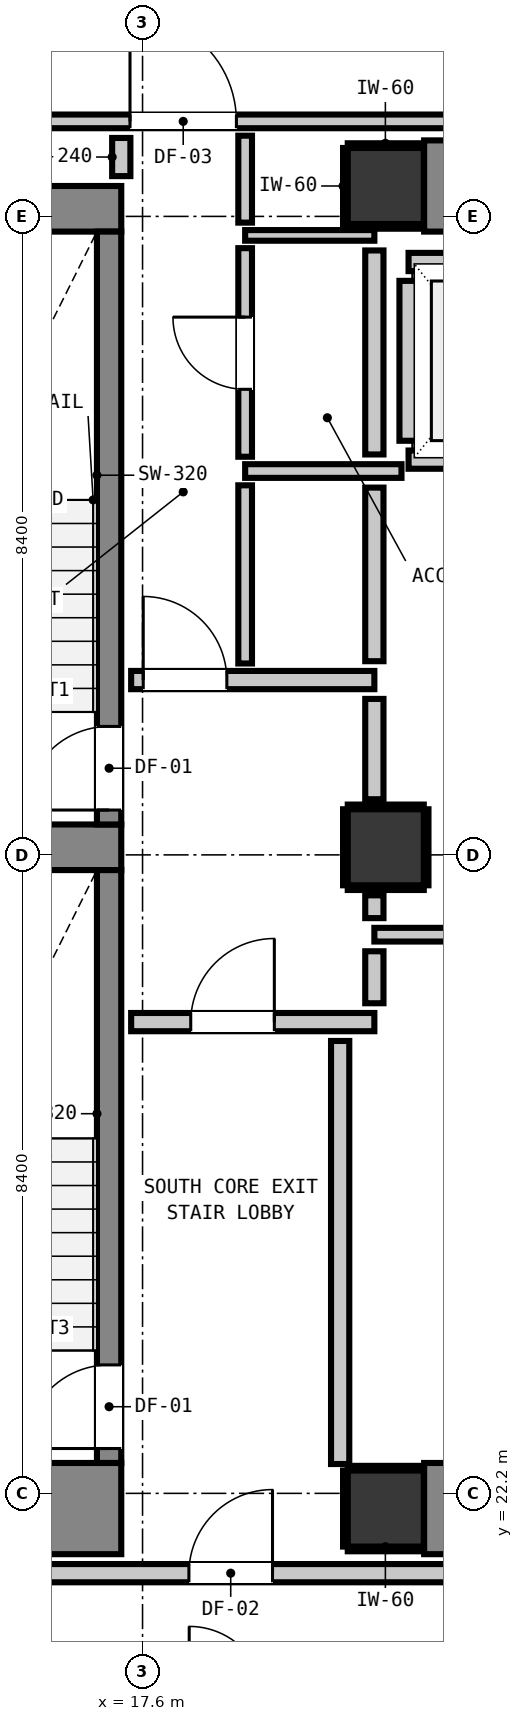
"""IFC4 building model, lengths in metres.
Left out: names, types, materials, properties, quantities, classifications, styles, units other than length and angle.
Written with IfcOpenShell. Run it as: python <this file> out.ifc"""

import sys

from ifc_helpers import new_model, si_unit, direction, frame, frame_2d, origin, origin_2d, place, context, subcontext, project, spatial, rectangle, extrude, element, fill, save


model = new_model("IFC4")
c1 = context("Model", 3, precision=1e-05, world=origin(), true_north=direction((0.0, 1.0)))
c2 = subcontext(c1, "Body", "Model", "MODEL_VIEW")
j1 = project(units=[si_unit("LENGTHUNIT", "METRE"), si_unit("PLANEANGLEUNIT", "RADIAN")], contexts=[c1])
p1 = place(None, origin())
s1 = spatial("IfcSite", under=j1, at=p1, CompositionType="ELEMENT")
p2 = place(p1, origin())
s2 = spatial("IfcBuilding", under=s1, at=p2, CompositionType="ELEMENT")
p3 = place(p2, frame((0.0, 0.0, 75.12)))
s3 = spatial("IfcBuildingStorey", under=s2, at=p3, CompositionType="ELEMENT", Elevation=75.12)
for number, where, z_axis, x_axis in (
    (1, (20.8, 22.0, 0.0), (0.0, 0.0, 1.0), (1.0, 0.0, 0.0)),
    (2, (20.8, 39.4, 0.0), (0.0, 0.0, 1.0), (1.0, 0.0, 0.0)),
):
    element("IfcColumn", number, at=place(p3, frame(where, z_axis=z_axis, x_axis=x_axis)), inside=s3, PredefinedType="COLUMN", context=c2, shape_type="SweptSolid", body=[
        extrude(rectangle(XDim=1.0, YDim=1.0, at=origin_2d()), origin(), (0.0, 0.0, 1.0), 3.32),
    ])
p4 = place(p3, frame((13.24, 22.0, 0.0), z_axis=(0.0, 0.0, 1.0), x_axis=(1.0, 0.0, 0.0)))
e3 = element("IfcWall", 3, at=p4, inside=s3, PredefinedType="SHEAR", context=c2, shape_type="SweptSolid", body=[
    extrude(rectangle(XDim=4.08, YDim=1.2, at=frame_2d((2.04, 0.0))), origin(), (0.0, 0.0, 1.0), 3.32),
])
p5 = place(p3, frame((13.24, 39.1, 0.0), z_axis=(0.0, 0.0, 1.0), x_axis=(1.0, 0.0, 0.0)))
e4 = element("IfcWall", 4, at=p5, inside=s3, PredefinedType="SHEAR", context=c2, shape_type="SweptSolid", body=[
    extrude(rectangle(XDim=4.08, YDim=0.6, at=frame_2d((2.04, 0.0))), origin(), (0.0, 0.0, 1.0), 3.32),
])
p6 = place(p3, frame((13.905, 30.7, 0.0), z_axis=(0.0, 0.0, 1.0), x_axis=(1.0, 0.0, 0.0)))
e5 = element("IfcWall", 5, at=p6, inside=s3, PredefinedType="SHEAR", context=c2, shape_type="SweptSolid", body=[
    extrude(rectangle(XDim=3.415, YDim=0.6, at=frame_2d((1.708, 0.0))), origin(), (0.0, 0.0, 1.0), 3.32),
])
for number, where, z_axis, x_axis in (
    (6, (21.305, 22.0, 0.0), (0.0, 0.0, 1.0), (1.0, 0.0, 0.0)),
    (7, (21.305, 39.4, 0.0), (0.0, 0.0, 1.0), (1.0, 0.0, 0.0)),
):
    element("IfcWall", number, at=place(p3, frame(where, z_axis=z_axis, x_axis=x_axis)), inside=s3, PredefinedType="SHEAR", context=c2, shape_type="SweptSolid", body=[
        extrude(rectangle(XDim=7.39, YDim=1.2, at=frame_2d((3.695, 0.0))), origin(), (0.0, 0.0, 1.0), 3.32),
    ])
p7 = place(p3, frame((17.16, 31.0, 0.0), z_axis=(0.0, 0.0, 1.0), x_axis=(0.0, 1.0, 0.0)))
e8 = element("IfcWall", 8, at=p7, inside=s3, PredefinedType="SHEAR", context=c2, shape_type="SweptSolid", body=[
    extrude(rectangle(XDim=7.8, YDim=0.32, at=frame_2d((3.9, 0.0))), origin(), (0.0, 0.0, 1.0), 3.32),
])
p8 = place(p7, frame((0.19, 0.0, 0.0)))
e9 = element("IfcOpeningElement", 9, at=p8, cuts=e8, PredefinedType="OPENING", context=c2, shape_type="SweptSolid", body=[
    extrude(rectangle(XDim=1.1, YDim=2.15, at=frame_2d((0.55, 1.075))), frame((0.0, 0.17, 0.0), z_axis=(0.0, -1.0, 0.0), x_axis=(1.0, 0.0, 0.0)), (0.0, 0.0, 1.0), 0.34),
])
p9 = place(p3, frame((17.16, 22.6, 0.0), z_axis=(0.0, 0.0, 1.0), x_axis=(0.0, 1.0, 0.0)))
e10 = element("IfcWall", 10, at=p9, inside=s3, PredefinedType="SHEAR", context=c2, shape_type="SweptSolid", body=[
    extrude(rectangle(XDim=7.8, YDim=0.32, at=frame_2d((3.9, 0.0))), origin(), (0.0, 0.0, 1.0), 3.32),
])
p10 = place(p9, frame((0.19, 0.0, 0.0)))
e11 = element("IfcOpeningElement", 11, at=p10, cuts=e10, PredefinedType="OPENING", context=c2, shape_type="SweptSolid", body=[
    extrude(rectangle(XDim=1.1, YDim=2.15, at=frame_2d((0.55, 1.075))), frame((0.0, 0.17, 0.0), z_axis=(0.0, -1.0, 0.0), x_axis=(1.0, 0.0, 0.0)), (0.0, 0.0, 1.0), 0.34),
])
p11 = place(p3, frame((20.8, 30.7, 0.0), z_axis=(0.0, 0.0, 1.0), x_axis=(1.0, 0.0, 0.0)))
e12 = element("IfcColumn", 12, at=p11, inside=s3, PredefinedType="COLUMN", context=c2, shape_type="SweptSolid", body=[
    extrude(rectangle(XDim=1.0, YDim=1.0, at=origin_2d()), origin(), (0.0, 0.0, 1.0), 3.32),
])
for number, where, z_axis, x_axis in (
    (13, (21.1, 35.8, 0.0), (0.0, 0.0, 1.0), (1.0, 0.0, 0.0)),
    (14, (21.1, 38.4, 0.0), (0.0, 0.0, 1.0), (1.0, 0.0, 0.0)),
):
    element("IfcWall", number, at=place(p3, frame(where, z_axis=z_axis, x_axis=x_axis)), inside=s3, PredefinedType="PARTITIONING", context=c2, shape_type="SweptSolid", body=[
        extrude(rectangle(XDim=2.2, YDim=0.24, at=frame_2d((1.1, 0.0))), origin(), (0.0, 0.0, 1.0), 3.06),
    ])
p12 = place(p3, frame((21.1, 36.048, 0.0), z_axis=(0.0, 0.0, 1.0), x_axis=(0.0, 1.0, 0.0)))
e15 = element("IfcWall", 15, at=p12, inside=s3, PredefinedType="PARTITIONING", context=c2, shape_type="SweptSolid", body=[
    extrude(rectangle(XDim=2.104, YDim=0.24, at=frame_2d((1.052, 0.0))), origin(), (0.0, 0.0, 1.0), 2.295),
])
p13 = place(p3, frame((10.15, 21.15, 0.0), z_axis=(0.0, 0.0, 1.0), x_axis=(1.0, 0.0, 0.0)))
e16 = element("IfcWall", 16, at=p13, inside=s3, PredefinedType="PARTITIONING", context=c2, shape_type="SweptSolid", body=[
    extrude(rectangle(XDim=26.779, YDim=0.24, at=frame_2d((13.39, 0.0))), origin(), (0.0, 0.0, 1.0), 3.06),
])
p14 = place(p13, frame((8.06, 0.0, 0.0)))
e17 = element("IfcOpeningElement", 17, at=p14, cuts=e16, PredefinedType="OPENING", context=c2, shape_type="SweptSolid", body=[
    extrude(rectangle(XDim=1.1, YDim=2.15, at=frame_2d((0.55, 1.075))), frame((0.0, 0.13, 0.0), z_axis=(0.0, -1.0, 0.0), x_axis=(1.0, 0.0, 0.0)), (0.0, 0.0, 1.0), 0.26),
])
p15 = place(p13, frame((0.324, 0.0, 0.0)))
e18 = element("IfcOpeningElement", 18, at=p15, cuts=e16, PredefinedType="OPENING", context=c2, shape_type="SweptSolid", body=[
    extrude(rectangle(XDim=1.4, YDim=2.15, at=frame_2d((0.7, 1.075))), frame((0.0, 0.13, 0.0), z_axis=(0.0, -1.0, 0.0), x_axis=(1.0, 0.0, 0.0)), (0.0, 0.0, 1.0), 0.26),
])
p16 = place(p3, frame((17.45, 28.4, 0.0), z_axis=(0.0, 0.0, 1.0), x_axis=(1.0, 0.0, 0.0)))
e19 = element("IfcWall", 19, at=p16, inside=s3, PredefinedType="PARTITIONING", context=c2, shape_type="SweptSolid", body=[
    extrude(rectangle(XDim=3.2, YDim=0.24, at=frame_2d((1.6, 0.0))), origin(), (0.0, 0.0, 1.0), 3.06),
])
p17 = place(p16, frame((0.784, 0.0, 0.0)))
e20 = element("IfcOpeningElement", 20, at=p17, cuts=e19, PredefinedType="OPENING", context=c2, shape_type="SweptSolid", body=[
    extrude(rectangle(XDim=1.1, YDim=2.15, at=frame_2d((0.55, 1.075))), frame((0.0, 0.13, 0.0), z_axis=(0.0, -1.0, 0.0), x_axis=(1.0, 0.0, 0.0)), (0.0, 0.0, 1.0), 0.26),
])
p18 = place(p3, frame((17.45, 32.9, 0.0), z_axis=(0.0, 0.0, 1.0), x_axis=(1.0, 0.0, 0.0)))
e21 = element("IfcWall", 21, at=p18, inside=s3, PredefinedType="PARTITIONING", context=c2, shape_type="SweptSolid", body=[
    extrude(rectangle(XDim=3.2, YDim=0.24, at=frame_2d((1.6, 0.0))), origin(), (0.0, 0.0, 1.0), 3.06),
])
p19 = place(p18, frame((0.159, 0.0, 0.0)))
e22 = element("IfcOpeningElement", 22, at=p19, cuts=e21, PredefinedType="OPENING", context=c2, shape_type="SweptSolid", body=[
    extrude(rectangle(XDim=1.1, YDim=2.15, at=frame_2d((0.55, 1.075))), frame((0.0, 0.13, 0.0), z_axis=(0.0, -1.0, 0.0), x_axis=(1.0, 0.0, 0.0)), (0.0, 0.0, 1.0), 0.26),
])
p20 = place(p3, frame((20.65, 29.55, 0.0), z_axis=(0.0, 0.0, 1.0), x_axis=(1.0, 0.0, 0.0)))
e23 = element("IfcWall", 23, at=p20, inside=s3, PredefinedType="PARTITIONING", context=c2, shape_type="SweptSolid", body=[
    extrude(rectangle(XDim=9.325, YDim=0.18, at=frame_2d((4.663, 0.0))), origin(), (0.0, 0.0, 1.0), 3.06),
])
p21 = place(p3, frame((18.95, 35.65, 0.0), z_axis=(0.0, 0.0, 1.0), x_axis=(1.0, 0.0, 0.0)))
e24 = element("IfcWall", 24, at=p21, inside=s3, PredefinedType="PARTITIONING", context=c2, shape_type="SweptSolid", body=[
    extrude(rectangle(XDim=2.057, YDim=0.18, at=frame_2d((1.029, 0.0))), origin(), (0.0, 0.0, 1.0), 3.06),
])
p22 = place(p3, frame((10.15, 40.25, 0.0), z_axis=(0.0, 0.0, 1.0), x_axis=(1.0, 0.0, 0.0)))
e25 = element("IfcWall", 25, at=p22, inside=s3, PredefinedType="PARTITIONING", context=c2, shape_type="SweptSolid", body=[
    extrude(rectangle(XDim=40.023, YDim=0.18, at=frame_2d((20.012, 0.0))), origin(), (0.0, 0.0, 1.0), 3.06),
])
p23 = place(p22, frame((7.285, 0.0, 0.0)))
e26 = element("IfcOpeningElement", 26, at=p23, cuts=e25, PredefinedType="OPENING", context=c2, shape_type="SweptSolid", body=[
    extrude(rectangle(XDim=1.4, YDim=2.15, at=frame_2d((0.7, 1.075))), frame((0.0, 0.1, 0.0), z_axis=(0.0, -1.0, 0.0), x_axis=(1.0, 0.0, 0.0)), (0.0, 0.0, 1.0), 0.2),
])
p24 = place(p22, frame((0.324, 0.0, 0.0)))
e27 = element("IfcOpeningElement", 27, at=p24, cuts=e25, PredefinedType="OPENING", context=c2, shape_type="SweptSolid", body=[
    extrude(rectangle(XDim=1.4, YDim=2.15, at=frame_2d((0.7, 1.075))), frame((0.0, 0.1, 0.0), z_axis=(0.0, -1.0, 0.0), x_axis=(1.0, 0.0, 0.0)), (0.0, 0.0, 1.0), 0.2),
])
p25 = place(p22, frame((33.574, 0.0, 0.0)))
e28 = element("IfcOpeningElement", 28, at=p25, cuts=e25, PredefinedType="OPENING", context=c2, shape_type="SweptSolid", body=[
    extrude(rectangle(XDim=1.0, YDim=2.15, at=frame_2d((0.5, 1.075))), frame((0.0, 0.1, 0.0), z_axis=(0.0, -1.0, 0.0), x_axis=(1.0, 0.0, 0.0)), (0.0, 0.0, 1.0), 0.2),
])
p26 = place(p3, frame((18.95, 38.75, 0.0), z_axis=(0.0, 0.0, 1.0), x_axis=(1.0, 0.0, 0.0)))
e29 = element("IfcWall", 29, at=p26, inside=s3, PredefinedType="PARTITIONING", context=c2, shape_type="SweptSolid", body=[
    extrude(rectangle(XDim=1.7, YDim=0.14, at=frame_2d((0.85, 0.0))), origin(), (0.0, 0.0, 1.0), 3.06),
])
p27 = place(p3, frame((17.32, 39.53, 0.0), z_axis=(0.0, 0.0, 1.0), x_axis=(0.0, 1.0, 0.0)))
e30 = element("IfcWall", 30, at=p27, inside=s3, PredefinedType="PARTITIONING", context=c2, shape_type="SweptSolid", body=[
    extrude(rectangle(XDim=0.502, YDim=0.24, at=frame_2d((0.251, 0.0))), origin(), (0.0, 0.0, 1.0), 3.06),
])
p28 = place(p3, frame((20.2, 22.586, 0.0), z_axis=(0.0, 0.0, 1.0), x_axis=(0.0, 1.0, 0.0)))
e31 = element("IfcWall", 31, at=p28, inside=s3, PredefinedType="PARTITIONING", context=c2, shape_type="SweptSolid", body=[
    extrude(rectangle(XDim=5.566, YDim=0.24, at=frame_2d((2.783, 0.0))), origin(), (0.0, 0.0, 1.0), 3.06),
])
p29 = place(p3, frame((20.65, 28.648, 0.0), z_axis=(0.0, 0.0, 1.0), x_axis=(0.0, 1.0, 0.0)))
e32 = element("IfcWall", 32, at=p29, inside=s3, PredefinedType="PARTITIONING", context=c2, shape_type="SweptSolid", body=[
    extrude(rectangle(XDim=0.684, YDim=0.24, at=frame_2d((0.342, 0.0))), origin(), (0.0, 0.0, 1.0), 2.295),
])
p30 = place(p3, frame((20.65, 29.768, 0.0), z_axis=(0.0, 0.0, 1.0), x_axis=(0.0, 1.0, 0.0)))
e33 = element("IfcWall", 33, at=p30, inside=s3, PredefinedType="PARTITIONING", context=c2, shape_type="SweptSolid", body=[
    extrude(rectangle(XDim=0.3, YDim=0.24, at=frame_2d((0.15, 0.0))), origin(), (0.0, 0.0, 1.0), 2.295),
])
p31 = place(p3, frame((20.65, 31.332, 0.0), z_axis=(0.0, 0.0, 1.0), x_axis=(0.0, 1.0, 0.0)))
e34 = element("IfcWall", 34, at=p31, inside=s3, PredefinedType="PARTITIONING", context=c2, shape_type="SweptSolid", body=[
    extrude(rectangle(XDim=1.32, YDim=0.24, at=frame_2d((0.66, 0.0))), origin(), (0.0, 0.0, 1.0), 2.295),
])
p32 = place(p3, frame((20.65, 33.148, 0.0), z_axis=(0.0, 0.0, 1.0), x_axis=(0.0, 1.0, 0.0)))
e35 = element("IfcWall", 35, at=p32, inside=s3, PredefinedType="PARTITIONING", context=c2, shape_type="SweptSolid", body=[
    extrude(rectangle(XDim=2.284, YDim=0.24, at=frame_2d((1.142, 0.0))), origin(), (0.0, 0.0, 1.0), 2.295),
])
p33 = place(p3, frame((20.65, 35.868, 0.0), z_axis=(0.0, 0.0, 1.0), x_axis=(0.0, 1.0, 0.0)))
e36 = element("IfcWall", 36, at=p33, inside=s3, PredefinedType="PARTITIONING", context=c2, shape_type="SweptSolid", body=[
    extrude(rectangle(XDim=2.684, YDim=0.24, at=frame_2d((1.342, 0.0))), origin(), (0.0, 0.0, 1.0), 2.295),
])
p34 = place(p3, frame((18.95, 33.118, 0.0), z_axis=(0.0, 0.0, 1.0), x_axis=(0.0, 1.0, 0.0)))
e37 = element("IfcWall", 37, at=p34, inside=s3, PredefinedType="PARTITIONING", context=c2, shape_type="SweptSolid", body=[
    extrude(rectangle(XDim=2.344, YDim=0.18, at=frame_2d((1.172, 0.0))), origin(), (0.0, 0.0, 1.0), 3.06),
])
p35 = place(p3, frame((18.95, 35.838, 0.0), z_axis=(0.0, 0.0, 1.0), x_axis=(0.0, 1.0, 0.0)))
e38 = element("IfcWall", 38, at=p35, inside=s3, PredefinedType="PARTITIONING", context=c2, shape_type="SweptSolid", body=[
    extrude(rectangle(XDim=2.744, YDim=0.18, at=frame_2d((1.372, 0.0))), origin(), (0.0, 0.0, 1.0), 3.06),
])
p36 = place(p35, frame((0.887, 0.0, 0.0)))
e39 = element("IfcOpeningElement", 39, at=p36, cuts=e38, PredefinedType="OPENING", context=c2, shape_type="SweptSolid", body=[
    extrude(rectangle(XDim=0.95, YDim=2.1, at=frame_2d((0.475, 1.05))), frame((0.0, 0.1, 0.0), z_axis=(0.0, -1.0, 0.0), x_axis=(1.0, 0.0, 0.0)), (0.0, 0.0, 1.0), 0.2),
])
p37 = place(p3, frame((18.95, 38.918, 0.0), z_axis=(0.0, 0.0, 1.0), x_axis=(0.0, 1.0, 0.0)))
e40 = element("IfcWall", 40, at=p37, inside=s3, PredefinedType="PARTITIONING", context=c2, shape_type="SweptSolid", body=[
    extrude(rectangle(XDim=1.144, YDim=0.18, at=frame_2d((0.572, 0.0))), origin(), (0.0, 0.0, 1.0), 3.06),
])
for number, where, z_axis, x_axis in (
    (41, (20.3, 21.468, 0.0), (0.0, 0.0, 1.0), (1.0, 0.0, 0.0)),
    (42, (20.3, 22.532, 0.0), (0.0, 0.0, 1.0), (1.0, 0.0, 0.0)),
):
    element("IfcWall", number, at=place(p3, frame(where, z_axis=z_axis, x_axis=x_axis)), inside=s3, PredefinedType="PARTITIONING", context=c2, shape_type="SweptSolid", body=[
        extrude(rectangle(XDim=0.99, YDim=0.06, at=frame_2d((0.495, 0.0))), origin(), (0.0, 0.0, 1.0), 1.45),
    ])
p38 = place(p3, frame((20.268, 21.5, 0.0), z_axis=(0.0, 0.0, 1.0), x_axis=(0.0, 1.0, 0.0)))
e43 = element("IfcWall", 43, at=p38, inside=s3, PredefinedType="PARTITIONING", context=c2, shape_type="SweptSolid", body=[
    extrude(rectangle(XDim=1.0, YDim=0.06, at=frame_2d((0.5, 0.0))), origin(), (0.0, 0.0, 1.0), 1.45),
])
for number, where, z_axis, x_axis in (
    (44, (20.3, 38.868, 0.0), (0.0, 0.0, 1.0), (1.0, 0.0, 0.0)),
    (45, (20.3, 39.932, 0.0), (0.0, 0.0, 1.0), (1.0, 0.0, 0.0)),
):
    element("IfcWall", number, at=place(p3, frame(where, z_axis=z_axis, x_axis=x_axis)), inside=s3, PredefinedType="PARTITIONING", context=c2, shape_type="SweptSolid", body=[
        extrude(rectangle(XDim=0.99, YDim=0.06, at=frame_2d((0.495, 0.0))), origin(), (0.0, 0.0, 1.0), 1.45),
    ])
for number, where, z_axis, x_axis in (
    (46, (20.268, 38.9, 0.0), (0.0, 0.0, 1.0), (0.0, 1.0, 0.0)),
    (47, (20.3, 30.168, 0.0), (0.0, 0.0, 1.0), (1.0, 0.0, 0.0)),
    (48, (20.3, 31.232, 0.0), (0.0, 0.0, 1.0), (1.0, 0.0, 0.0)),
    (49, (20.268, 30.2, 0.0), (0.0, 0.0, 1.0), (0.0, 1.0, 0.0)),
    (50, (21.332, 30.2, 0.0), (0.0, 0.0, 1.0), (0.0, 1.0, 0.0)),
):
    element("IfcWall", number, at=place(p3, frame(where, z_axis=z_axis, x_axis=x_axis)), inside=s3, PredefinedType="PARTITIONING", context=c2, shape_type="SweptSolid", body=[
        extrude(rectangle(XDim=1.0, YDim=0.06, at=frame_2d((0.5, 0.0))), origin(), (0.0, 0.0, 1.0), 1.45),
    ])
p39 = place(p8, origin())
e51 = element("IfcDoor", 51, at=p39, inside=s3, OperationType="SINGLE_SWING_LEFT", PredefinedType="DOOR", context=c2, shape_type="SweptSolid", body=[
    extrude(rectangle(XDim=1.1, YDim=2.15, at=frame_2d((0.55, 1.075))), frame((0.0, 0.025, 0.0), z_axis=(0.0, -1.0, 0.0), x_axis=(1.0, 0.0, 0.0)), (0.0, 0.0, 1.0), 0.05),
])
fill(e9, e51)
p40 = place(p10, origin())
e52 = element("IfcDoor", 52, at=p40, inside=s3, OperationType="SINGLE_SWING_LEFT", PredefinedType="DOOR", context=c2, shape_type="SweptSolid", body=[
    extrude(rectangle(XDim=1.1, YDim=2.15, at=frame_2d((0.55, 1.075))), frame((0.0, 0.025, 0.0), z_axis=(0.0, -1.0, 0.0), x_axis=(1.0, 0.0, 0.0)), (0.0, 0.0, 1.0), 0.05),
])
fill(e11, e52)
p41 = place(p17, origin())
e53 = element("IfcDoor", 53, at=p41, inside=s3, OperationType="SINGLE_SWING_RIGHT", PredefinedType="DOOR", context=c2, shape_type="SweptSolid", body=[
    extrude(rectangle(XDim=1.1, YDim=2.15, at=frame_2d((0.55, 1.075))), frame((0.0, 0.025, 0.0), z_axis=(0.0, -1.0, 0.0), x_axis=(1.0, 0.0, 0.0)), (0.0, 0.0, 1.0), 0.05),
])
fill(e20, e53)
p42 = place(p19, origin())
e54 = element("IfcDoor", 54, at=p42, inside=s3, OperationType="SINGLE_SWING_LEFT", PredefinedType="DOOR", context=c2, shape_type="SweptSolid", body=[
    extrude(rectangle(XDim=1.1, YDim=2.15, at=frame_2d((0.55, 1.075))), frame((0.0, 0.025, 0.0), z_axis=(0.0, -1.0, 0.0), x_axis=(1.0, 0.0, 0.0)), (0.0, 0.0, 1.0), 0.05),
])
fill(e22, e54)
p43 = place(p14, origin())
e55 = element("IfcDoor", 55, at=p43, inside=s3, OperationType="SINGLE_SWING_RIGHT", PredefinedType="DOOR", context=c2, shape_type="SweptSolid", body=[
    extrude(rectangle(XDim=1.1, YDim=2.15, at=frame_2d((0.55, 1.075))), frame((0.0, 0.025, 0.0), z_axis=(0.0, -1.0, 0.0), x_axis=(1.0, 0.0, 0.0)), (0.0, 0.0, 1.0), 0.05),
])
fill(e17, e55)
p44 = place(p23, origin())
e56 = element("IfcDoor", 56, at=p44, inside=s3, OperationType="SINGLE_SWING_LEFT", PredefinedType="DOOR", context=c2, shape_type="SweptSolid", body=[
    extrude(rectangle(XDim=1.4, YDim=2.15, at=frame_2d((0.7, 1.075))), frame((0.0, 0.025, 0.0), z_axis=(0.0, -1.0, 0.0), x_axis=(1.0, 0.0, 0.0)), (0.0, 0.0, 1.0), 0.05),
])
fill(e26, e56)
p45 = place(p36, origin())
e57 = element("IfcDoor", 57, at=p45, inside=s3, OperationType="SINGLE_SWING_RIGHT", PredefinedType="DOOR", context=c2, shape_type="SweptSolid", body=[
    extrude(rectangle(XDim=0.95, YDim=2.1, at=frame_2d((0.475, 1.05))), frame((0.0, 0.025, 0.0), z_axis=(0.0, -1.0, 0.0), x_axis=(1.0, 0.0, 0.0)), (0.0, 0.0, 1.0), 0.05),
])
fill(e39, e57)
save(model, sys.argv[1])
